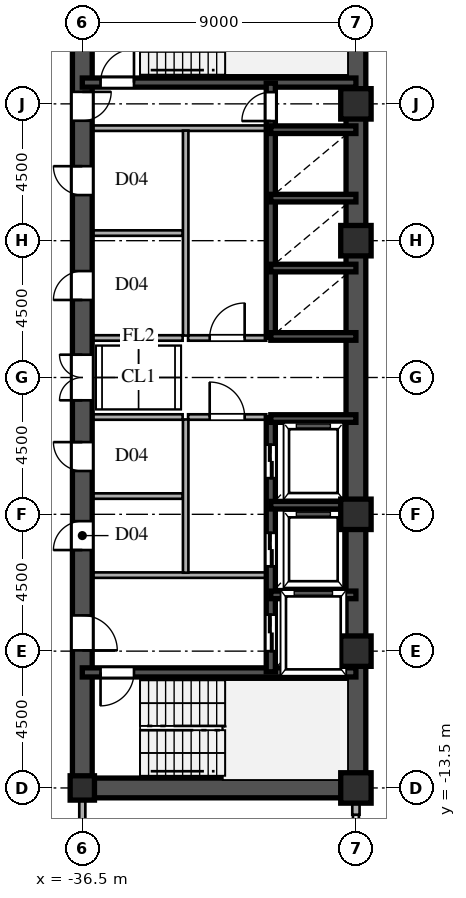
"""IFC4 building model, lengths in metres.
Left out: names, types, materials, properties, quantities, classifications, styles, units other than length and angle.
Written with IfcOpenShell. Run it as: python <this file> out.ifc"""

import sys

from ifc_helpers import new_model, si_unit, direction, frame, frame_2d, origin, origin_2d, place, context, subcontext, project, spatial, rectangle, hollow_rectangle, i_section, extrude, source, transform, mapped, element, fill, save


model = new_model("IFC4")
c1 = context("Model", 3, precision=1e-05, world=origin(), true_north=direction((0.0, 1.0)))
c2 = subcontext(c1, "Body", "Model", "MODEL_VIEW")
j1 = project(units=[si_unit("LENGTHUNIT", "METRE"), si_unit("PLANEANGLEUNIT", "RADIAN")], contexts=[c1])
p1 = place(None, origin())
s1 = spatial("IfcSite", under=j1, at=p1, CompositionType="ELEMENT")
p2 = place(p1, origin())
s2 = spatial("IfcBuilding", under=s1, at=p2, CompositionType="ELEMENT")
p3 = place(p2, frame((0.0, 0.0, 96.0)))
s3 = spatial("IfcBuildingStorey", under=s2, at=p3, CompositionType="ELEMENT", Elevation=96.0)
m1 = source(origin(), c2, "Body", "SweptSolid", [
    extrude(hollow_rectangle(XDim=1.0, YDim=1.0, WallThickness=0.042, at=origin_2d()), origin(), (0.0, 0.0, 1.0), 3.6),
])
for number, where, z_axis, x_axis in (
    (1, (-27.5, -13.5, 0.0), (0.0, 0.0, 1.0), (1.0, 0.0, 0.0)),
    (2, (-27.5, -9.0, 0.0), (0.0, 0.0, 1.0), (1.0, 0.0, 0.0)),
    (3, (-27.5, -4.5, 0.0), (0.0, 0.0, 1.0), (1.0, 0.0, 0.0)),
    (4, (-27.5, 4.5, 0.0), (0.0, 0.0, 1.0), (1.0, 0.0, 0.0)),
    (5, (-27.5, 9.0, 0.0), (0.0, 0.0, 1.0), (1.0, 0.0, 0.0)),
):
    element("IfcColumn", number, at=place(p3, frame(where, z_axis=z_axis, x_axis=x_axis)), inside=s3, PredefinedType="COLUMN", context=c2, shape_type="MappedRepresentation", body=[
        mapped(m1, transform((0.0, 0.0, 0.0), scale=1.0)),
    ])
m2 = source(origin(), c2, "Body", "SweptSolid", [
    extrude(i_section(OverallWidth=0.8, OverallDepth=0.8, WebThickness=0.032, FlangeThickness=0.05, at=origin_2d()), origin(), (0.0, 0.0, 1.0), 3.6),
])
p4 = place(p3, frame((-36.5, -13.5, 0.0), z_axis=(0.0, 0.0, 1.0), x_axis=(1.0, 0.0, 0.0)))
e6 = element("IfcColumn", 6, at=p4, inside=s3, PredefinedType="COLUMN", context=c2, shape_type="MappedRepresentation", body=[
    mapped(m2, transform((0.0, 0.0, 0.0), scale=1.0)),
])
p5 = place(p3, frame((-27.5, -14.38, 0.0), z_axis=(0.0, 0.0, 1.0), x_axis=(0.0, 1.0, 0.0)))
e7 = element("IfcWall", 7, at=p5, inside=s3, PredefinedType="SOLIDWALL", context=c2, shape_type="SweptSolid", body=[
    extrude(rectangle(XDim=0.55, YDim=0.24, at=frame_2d((0.275, 0.0))), origin(), (0.0, 0.0, 1.0), 2.88),
])
for number, where, z_axis, x_axis in (
    (8, (-27.5, -13.5, 0.0), (0.0, 0.0, 1.0), (0.0, 1.0, 0.0)),
    (9, (-27.5, 1.3, 0.0), (0.0, 0.0, 1.0), (0.0, 1.0, 0.0)),
):
    element("IfcWall", number, at=place(p3, frame(where, z_axis=z_axis, x_axis=x_axis)), inside=s3, PredefinedType="SHEAR", context=c2, shape_type="SweptSolid", body=[
        extrude(rectangle(XDim=12.2, YDim=0.65, at=frame_2d((6.1, 0.0))), origin(), (0.0, 0.0, 1.0), 3.38),
    ])
p6 = place(p3, frame((-27.5, -1.3, 0.0), z_axis=(0.0, 0.0, 1.0), x_axis=(0.0, 1.0, 0.0)))
e10 = element("IfcWall", 10, at=p6, inside=s3, PredefinedType="SHEAR", context=c2, shape_type="SweptSolid", body=[
    extrude(rectangle(XDim=2.6, YDim=0.65, at=frame_2d((1.3, 0.0))), origin(), (0.0, 0.0, 1.0), 3.38),
])
p7 = place(p3, frame((-36.5, -13.5, 0.0), z_axis=(0.0, 0.0, 1.0), x_axis=(1.0, 0.0, 0.0)))
e11 = element("IfcWall", 11, at=p7, inside=s3, PredefinedType="SHEAR", context=c2, shape_type="SweptSolid", body=[
    extrude(rectangle(XDim=9.0, YDim=0.65, at=frame_2d((4.5, 0.0))), origin(), (0.0, 0.0, 1.0), 3.38),
])
p8 = place(p3, frame((-36.5, -13.65, 0.0), z_axis=(0.0, 0.0, 1.0), x_axis=(0.0, 1.0, 0.0)))
e12 = element("IfcWall", 12, at=p8, inside=s3, PredefinedType="SHEAR", context=c2, shape_type="SweptSolid", body=[
    extrude(rectangle(XDim=7.15, YDim=0.65, at=frame_2d((3.575, 0.0))), origin(), (0.0, 0.0, 1.0), 3.38),
])
p9 = place(p8, frame((4.675, 0.0, 0.0)))
e13 = element("IfcOpeningElement", 13, at=p9, cuts=e12, PredefinedType="OPENING", context=c2, shape_type="SweptSolid", body=[
    extrude(rectangle(XDim=1.15, YDim=2.2, at=frame_2d((0.575, 1.1))), frame((0.0, 0.335, 0.0), z_axis=(0.0, -1.0, 0.0), x_axis=(1.0, 0.0, 0.0)), (0.0, 0.0, 1.0), 0.67),
])
p10 = place(p3, frame((-36.5, -1.3, 0.0), z_axis=(0.0, 0.0, 1.0), x_axis=(0.0, 1.0, 0.0)))
e14 = element("IfcWall", 14, at=p10, inside=s3, PredefinedType="SHEAR", context=c2, shape_type="SweptSolid", body=[
    extrude(rectangle(XDim=2.6, YDim=0.65, at=frame_2d((1.3, 0.0))), origin(), (0.0, 0.0, 1.0), 3.38),
])
p11 = place(p10, frame((0.55, 0.0, 0.0)))
e15 = element("IfcOpeningElement", 15, at=p11, cuts=e14, PredefinedType="OPENING", context=c2, shape_type="SweptSolid", body=[
    extrude(rectangle(XDim=1.5, YDim=2.3, at=frame_2d((0.75, 1.15))), frame((0.0, 0.335, 0.0), z_axis=(0.0, -1.0, 0.0), x_axis=(1.0, 0.0, 0.0)), (0.0, 0.0, 1.0), 0.67),
])
p12 = place(p3, frame((-36.5, 8.2, 0.0), z_axis=(0.0, 0.0, 1.0), x_axis=(0.0, 1.0, 0.0)))
e16 = element("IfcWall", 16, at=p12, inside=s3, PredefinedType="SHEAR", context=c2, shape_type="SweptSolid", body=[
    extrude(rectangle(XDim=5.45, YDim=0.65, at=frame_2d((2.725, 0.0))), origin(), (0.0, 0.0, 1.0), 3.38),
])
p13 = place(p12, frame((0.245, 0.0, 0.0)))
e17 = element("IfcOpeningElement", 17, at=p13, cuts=e16, PredefinedType="OPENING", context=c2, shape_type="SweptSolid", body=[
    extrude(rectangle(XDim=0.95, YDim=2.15, at=frame_2d((0.475, 1.075))), frame((0.0, 0.335, 0.0), z_axis=(0.0, -1.0, 0.0), x_axis=(1.0, 0.0, 0.0)), (0.0, 0.0, 1.0), 0.67),
])
p14 = place(p3, frame((-36.5, -6.5, 0.0), z_axis=(0.0, 0.0, 1.0), x_axis=(0.0, 1.0, 0.0)))
e18 = element("IfcWall", 18, at=p14, inside=s3, PredefinedType="SHEAR", context=c2, shape_type="SweptSolid", body=[
    extrude(rectangle(XDim=2.6, YDim=0.65, at=frame_2d((1.3, 0.0))), origin(), (0.0, 0.0, 1.0), 3.38),
])
p15 = place(p14, frame((0.825, 0.0, 0.0)))
e19 = element("IfcOpeningElement", 19, at=p15, cuts=e18, PredefinedType="OPENING", context=c2, shape_type="SweptSolid", body=[
    extrude(rectangle(XDim=0.95, YDim=2.15, at=frame_2d((0.475, 1.075))), frame((0.0, 0.335, 0.0), z_axis=(0.0, -1.0, 0.0), x_axis=(1.0, 0.0, 0.0)), (0.0, 0.0, 1.0), 0.67),
])
p16 = place(p3, frame((-36.5, -3.9, 0.0), z_axis=(0.0, 0.0, 1.0), x_axis=(0.0, 1.0, 0.0)))
e20 = element("IfcWall", 20, at=p16, inside=s3, PredefinedType="SHEAR", context=c2, shape_type="SweptSolid", body=[
    extrude(rectangle(XDim=2.6, YDim=0.65, at=frame_2d((1.3, 0.0))), origin(), (0.0, 0.0, 1.0), 3.38),
])
p17 = place(p16, frame((0.825, 0.0, 0.0)))
e21 = element("IfcOpeningElement", 21, at=p17, cuts=e20, PredefinedType="OPENING", context=c2, shape_type="SweptSolid", body=[
    extrude(rectangle(XDim=0.95, YDim=2.15, at=frame_2d((0.475, 1.075))), frame((0.0, 0.335, 0.0), z_axis=(0.0, -1.0, 0.0), x_axis=(1.0, 0.0, 0.0)), (0.0, 0.0, 1.0), 0.67),
])
p18 = place(p3, frame((-36.5, 1.3, 0.0), z_axis=(0.0, 0.0, 1.0), x_axis=(0.0, 1.0, 0.0)))
e22 = element("IfcWall", 22, at=p18, inside=s3, PredefinedType="SHEAR", context=c2, shape_type="SweptSolid", body=[
    extrude(rectangle(XDim=3.45, YDim=0.65, at=frame_2d((1.725, 0.0))), origin(), (0.0, 0.0, 1.0), 3.38),
])
p19 = place(p18, frame((1.25, 0.0, 0.0)))
e23 = element("IfcOpeningElement", 23, at=p19, cuts=e22, PredefinedType="OPENING", context=c2, shape_type="SweptSolid", body=[
    extrude(rectangle(XDim=0.95, YDim=2.15, at=frame_2d((0.475, 1.075))), frame((0.0, 0.335, 0.0), z_axis=(0.0, -1.0, 0.0), x_axis=(1.0, 0.0, 0.0)), (0.0, 0.0, 1.0), 0.67),
])
p20 = place(p3, frame((-36.5, 4.75, 0.0), z_axis=(0.0, 0.0, 1.0), x_axis=(0.0, 1.0, 0.0)))
e24 = element("IfcWall", 24, at=p20, inside=s3, PredefinedType="SHEAR", context=c2, shape_type="SweptSolid", body=[
    extrude(rectangle(XDim=3.45, YDim=0.65, at=frame_2d((1.725, 0.0))), origin(), (0.0, 0.0, 1.0), 3.38),
])
p21 = place(p20, frame((1.25, 0.0, 0.0)))
e25 = element("IfcOpeningElement", 25, at=p21, cuts=e24, PredefinedType="OPENING", context=c2, shape_type="SweptSolid", body=[
    extrude(rectangle(XDim=0.95, YDim=2.15, at=frame_2d((0.475, 1.075))), frame((0.0, 0.335, 0.0), z_axis=(0.0, -1.0, 0.0), x_axis=(1.0, 0.0, 0.0)), (0.0, 0.0, 1.0), 0.67),
])
p22 = place(p3, frame((-36.5, -9.7, 0.0), z_axis=(0.0, 0.0, 1.0), x_axis=(1.0, 0.0, 0.0)))
e26 = element("IfcWall", 26, at=p22, inside=s3, PredefinedType="SHEAR", context=c2, shape_type="SweptSolid", body=[
    extrude(rectangle(XDim=9.0, YDim=0.3, at=frame_2d((4.5, 0.0))), origin(), (0.0, 0.0, 1.0), 3.38),
])
p23 = place(p22, frame((0.6, 0.0, 0.0)))
e27 = element("IfcOpeningElement", 27, at=p23, cuts=e26, PredefinedType="OPENING", context=c2, shape_type="SweptSolid", body=[
    extrude(rectangle(XDim=1.1, YDim=2.2, at=frame_2d((0.55, 1.1))), frame((0.0, 0.16, 0.0), z_axis=(0.0, -1.0, 0.0), x_axis=(1.0, 0.0, 0.0)), (0.0, 0.0, 1.0), 0.32),
])
p24 = place(p3, frame((-36.5, 9.7, 0.0), z_axis=(0.0, 0.0, 1.0), x_axis=(1.0, 0.0, 0.0)))
e28 = element("IfcWall", 28, at=p24, inside=s3, PredefinedType="SHEAR", context=c2, shape_type="SweptSolid", body=[
    extrude(rectangle(XDim=9.0, YDim=0.3, at=frame_2d((4.5, 0.0))), origin(), (0.0, 0.0, 1.0), 3.38),
])
p25 = place(p24, frame((0.6, 0.0, 0.0)))
e29 = element("IfcOpeningElement", 29, at=p25, cuts=e28, PredefinedType="OPENING", context=c2, shape_type="SweptSolid", body=[
    extrude(rectangle(XDim=1.1, YDim=2.2, at=frame_2d((0.55, 1.1))), frame((0.0, 0.16, 0.0), z_axis=(0.0, -1.0, 0.0), x_axis=(1.0, 0.0, 0.0)), (0.0, 0.0, 1.0), 0.32),
])
for number, where, z_axis, x_axis in (
    (30, (-30.3, -7.15, 0.0), (0.0, 0.0, 1.0), (1.0, 0.0, 0.0)),
    (31, (-30.3, -4.2, 0.0), (0.0, 0.0, 1.0), (1.0, 0.0, 0.0)),
    (32, (-30.3, -1.35, 0.0), (0.0, 0.0, 1.0), (1.0, 0.0, 0.0)),
    (33, (-30.3, 1.35, 0.0), (0.0, 0.0, 1.0), (1.0, 0.0, 0.0)),
    (34, (-30.3, 3.6, 0.0), (0.0, 0.0, 1.0), (1.0, 0.0, 0.0)),
    (35, (-30.3, 5.9, 0.0), (0.0, 0.0, 1.0), (1.0, 0.0, 0.0)),
    (36, (-30.3, 8.15, 0.0), (0.0, 0.0, 1.0), (1.0, 0.0, 0.0)),
):
    element("IfcWall", number, at=place(p3, frame(where, z_axis=z_axis, x_axis=x_axis)), inside=s3, PredefinedType="SHEAR", context=c2, shape_type="SweptSolid", body=[
        extrude(rectangle(XDim=2.8, YDim=0.25, at=frame_2d((1.4, 0.0))), origin(), (0.0, 0.0, 1.0), 3.38),
    ])
p26 = place(p3, frame((-30.3, -9.68, 0.0), z_axis=(0.0, 0.0, 1.0), x_axis=(0.0, 1.0, 0.0)))
e37 = element("IfcWall", 37, at=p26, inside=s3, PredefinedType="SHEAR", context=c2, shape_type="SweptSolid", body=[
    extrude(rectangle(XDim=2.56, YDim=0.3, at=frame_2d((1.28, 0.0))), origin(), (0.0, 0.0, 1.0), 3.38),
])
p27 = place(p26, frame((0.68, 0.0, 0.0)))
e38 = element("IfcOpeningElement", 38, at=p27, cuts=e37, PredefinedType="OPENING", context=c2, shape_type="SweptSolid", body=[
    extrude(rectangle(XDim=1.2, YDim=2.25, at=frame_2d((0.6, 1.125))), frame((0.0, 0.16, 0.0), z_axis=(0.0, -1.0, 0.0), x_axis=(1.0, 0.0, 0.0)), (0.0, 0.0, 1.0), 0.32),
])
p28 = place(p3, frame((-30.3, -7.12, 0.0), z_axis=(0.0, 0.0, 1.0), x_axis=(0.0, 1.0, 0.0)))
e39 = element("IfcWall", 39, at=p28, inside=s3, PredefinedType="SHEAR", context=c2, shape_type="SweptSolid", body=[
    extrude(rectangle(XDim=2.92, YDim=0.3, at=frame_2d((1.46, 0.0))), origin(), (0.0, 0.0, 1.0), 3.38),
])
p29 = place(p28, frame((0.91, 0.0, 0.0)))
e40 = element("IfcOpeningElement", 40, at=p29, cuts=e39, PredefinedType="OPENING", context=c2, shape_type="SweptSolid", body=[
    extrude(rectangle(XDim=1.1, YDim=2.2, at=frame_2d((0.55, 1.1))), frame((0.0, 0.16, 0.0), z_axis=(0.0, -1.0, 0.0), x_axis=(1.0, 0.0, 0.0)), (0.0, 0.0, 1.0), 0.32),
])
p30 = place(p3, frame((-30.3, -4.2, 0.0), z_axis=(0.0, 0.0, 1.0), x_axis=(0.0, 1.0, 0.0)))
e41 = element("IfcWall", 41, at=p30, inside=s3, PredefinedType="SHEAR", context=c2, shape_type="SweptSolid", body=[
    extrude(rectangle(XDim=2.88, YDim=0.3, at=frame_2d((1.44, 0.0))), origin(), (0.0, 0.0, 1.0), 3.38),
])
p31 = place(p30, frame((0.89, 0.0, 0.0)))
e42 = element("IfcOpeningElement", 42, at=p31, cuts=e41, PredefinedType="OPENING", context=c2, shape_type="SweptSolid", body=[
    extrude(rectangle(XDim=1.1, YDim=2.2, at=frame_2d((0.55, 1.1))), frame((0.0, 0.16, 0.0), z_axis=(0.0, -1.0, 0.0), x_axis=(1.0, 0.0, 0.0)), (0.0, 0.0, 1.0), 0.32),
])
p32 = place(p3, frame((-30.3, 1.32, 0.0), z_axis=(0.0, 0.0, 1.0), x_axis=(0.0, 1.0, 0.0)))
e43 = element("IfcWall", 43, at=p32, inside=s3, PredefinedType="SHEAR", context=c2, shape_type="SweptSolid", body=[
    extrude(rectangle(XDim=2.28, YDim=0.3, at=frame_2d((1.14, 0.0))), origin(), (0.0, 0.0, 1.0), 3.38),
])
p33 = place(p3, frame((-30.3, 3.6, 0.0), z_axis=(0.0, 0.0, 1.0), x_axis=(0.0, 1.0, 0.0)))
e44 = element("IfcWall", 44, at=p33, inside=s3, PredefinedType="SHEAR", context=c2, shape_type="SweptSolid", body=[
    extrude(rectangle(XDim=2.3, YDim=0.3, at=frame_2d((1.15, 0.0))), origin(), (0.0, 0.0, 1.0), 3.38),
])
p34 = place(p3, frame((-30.3, 5.9, 0.0), z_axis=(0.0, 0.0, 1.0), x_axis=(0.0, 1.0, 0.0)))
e45 = element("IfcWall", 45, at=p34, inside=s3, PredefinedType="SHEAR", context=c2, shape_type="SweptSolid", body=[
    extrude(rectangle(XDim=2.25, YDim=0.3, at=frame_2d((1.125, 0.0))), origin(), (0.0, 0.0, 1.0), 3.38),
])
p35 = place(p3, frame((-30.3, 8.15, 0.0), z_axis=(0.0, 0.0, 1.0), x_axis=(0.0, 1.0, 0.0)))
e46 = element("IfcWall", 46, at=p35, inside=s3, PredefinedType="SHEAR", context=c2, shape_type="SweptSolid", body=[
    extrude(rectangle(XDim=1.53, YDim=0.3, at=frame_2d((0.765, 0.0))), origin(), (0.0, 0.0, 1.0), 3.38),
])
p36 = place(p35, frame((0.285, 0.0, 0.0)))
e47 = element("IfcOpeningElement", 47, at=p36, cuts=e46, PredefinedType="OPENING", context=c2, shape_type="SweptSolid", body=[
    extrude(rectangle(XDim=0.95, YDim=2.15, at=frame_2d((0.475, 1.075))), frame((0.0, 0.16, 0.0), z_axis=(0.0, -1.0, 0.0), x_axis=(1.0, 0.0, 0.0)), (0.0, 0.0, 1.0), 0.32),
])
for number, where, z_axis, x_axis in (
    (48, (-36.15, -6.5, 0.0), (0.0, 0.0, 1.0), (1.0, 0.0, 0.0)),
    (49, (-36.15, 8.2, 0.0), (0.0, 0.0, 1.0), (1.0, 0.0, 0.0)),
):
    element("IfcWall", number, at=place(p3, frame(where, z_axis=z_axis, x_axis=x_axis)), inside=s3, PredefinedType="PARTITIONING", context=c2, shape_type="SweptSolid", body=[
        extrude(rectangle(XDim=5.7, YDim=0.18, at=frame_2d((2.85, 0.0))), origin(), (0.0, 0.0, 1.0), 3.38),
    ])
p37 = place(p3, frame((-33.1, -6.42, 0.0), z_axis=(0.0, 0.0, 1.0), x_axis=(0.0, 1.0, 0.0)))
e50 = element("IfcWall", 50, at=p37, inside=s3, PredefinedType="PARTITIONING", context=c2, shape_type="SweptSolid", body=[
    extrude(rectangle(XDim=5.04, YDim=0.18, at=frame_2d((2.52, 0.0))), origin(), (0.0, 0.0, 1.0), 3.38),
])
p38 = place(p3, frame((-33.1, 1.38, 0.0), z_axis=(0.0, 0.0, 1.0), x_axis=(0.0, 1.0, 0.0)))
e51 = element("IfcWall", 51, at=p38, inside=s3, PredefinedType="PARTITIONING", context=c2, shape_type="SweptSolid", body=[
    extrude(rectangle(XDim=6.74, YDim=0.18, at=frame_2d((3.37, 0.0))), origin(), (0.0, 0.0, 1.0), 3.38),
])
p39 = place(p3, frame((-33.02, -1.3, 0.0), z_axis=(0.0, 0.0, 1.0), x_axis=(1.0, 0.0, 0.0)))
e52 = element("IfcWall", 52, at=p39, inside=s3, PredefinedType="PARTITIONING", context=c2, shape_type="SweptSolid", body=[
    extrude(rectangle(XDim=2.57, YDim=0.18, at=frame_2d((1.285, 0.0))), origin(), (0.0, 0.0, 1.0), 3.38),
])
p40 = place(p39, frame((0.71, 0.0, 0.0)))
e53 = element("IfcOpeningElement", 53, at=p40, cuts=e52, PredefinedType="OPENING", context=c2, shape_type="SweptSolid", body=[
    extrude(rectangle(XDim=1.15, YDim=2.2, at=frame_2d((0.575, 1.1))), frame((0.0, 0.1, 0.0), z_axis=(0.0, -1.0, 0.0), x_axis=(1.0, 0.0, 0.0)), (0.0, 0.0, 1.0), 0.2),
])
p41 = place(p3, frame((-33.02, 1.3, 0.0), z_axis=(0.0, 0.0, 1.0), x_axis=(1.0, 0.0, 0.0)))
e54 = element("IfcWall", 54, at=p41, inside=s3, PredefinedType="PARTITIONING", context=c2, shape_type="SweptSolid", body=[
    extrude(rectangle(XDim=2.57, YDim=0.18, at=frame_2d((1.285, 0.0))), origin(), (0.0, 0.0, 1.0), 3.38),
])
p42 = place(p41, frame((0.71, 0.0, 0.0)))
e55 = element("IfcOpeningElement", 55, at=p42, cuts=e54, PredefinedType="OPENING", context=c2, shape_type="SweptSolid", body=[
    extrude(rectangle(XDim=1.15, YDim=2.2, at=frame_2d((0.575, 1.1))), frame((0.0, 0.1, 0.0), z_axis=(0.0, -1.0, 0.0), x_axis=(1.0, 0.0, 0.0)), (0.0, 0.0, 1.0), 0.2),
])
for number, where, z_axis, x_axis in (
    (56, (-36.15, -1.3, 0.0), (0.0, 0.0, 1.0), (1.0, 0.0, 0.0)),
    (57, (-36.15, 1.3, 0.0), (0.0, 0.0, 1.0), (1.0, 0.0, 0.0)),
    (58, (-36.15, -3.9, 0.0), (0.0, 0.0, 1.0), (1.0, 0.0, 0.0)),
    (59, (-36.15, 4.75, 0.0), (0.0, 0.0, 1.0), (1.0, 0.0, 0.0)),
):
    element("IfcWall", number, at=place(p3, frame(where, z_axis=z_axis, x_axis=x_axis)), inside=s3, PredefinedType="PARTITIONING", context=c2, shape_type="SweptSolid", body=[
        extrude(rectangle(XDim=2.95, YDim=0.18, at=frame_2d((1.475, 0.0))), origin(), (0.0, 0.0, 1.0), 3.38),
    ])
p43 = place(p3, frame((-36.5, -15.515, 0.0), z_axis=(0.0, 0.0, 1.0), x_axis=(0.0, 1.0, 0.0)))
e60 = element("IfcWall", 60, at=p43, inside=s3, PredefinedType="PARTITIONING", context=c2, shape_type="SweptSolid", body=[
    extrude(rectangle(XDim=1.685, YDim=0.2, at=frame_2d((0.842, 0.0))), origin(), (0.0, 0.0, 1.0), 2.68),
])
m3 = source(origin(), c2, "Body", "SweptSolid", [
    extrude(rectangle(XDim=1.15, YDim=2.2, at=frame_2d((0.575, 1.1))), frame((0.0, 0.025, 0.0), z_axis=(0.0, -1.0, 0.0), x_axis=(1.0, 0.0, 0.0)), (0.0, 0.0, 1.0), 0.05),
])
p44 = place(p9, frame((1.15, 0.0, 0.0), z_axis=(0.0, 0.0, 1.0), x_axis=(-1.0, 0.0, 0.0)))
e61 = element("IfcDoor", 61, at=p44, inside=s3, OperationType="SINGLE_SWING_LEFT", PredefinedType="DOOR", context=c2, shape_type="MappedRepresentation", body=[
    mapped(m3, transform((0.0, 0.0, 0.0), scale=1.0)),
])
fill(e13, e61)
m4 = source(origin(), c2, "Body", "SweptSolid", [
    extrude(rectangle(XDim=1.5, YDim=2.3, at=frame_2d((0.75, 1.15))), frame((0.0, 0.025, 0.0), z_axis=(0.0, -1.0, 0.0), x_axis=(1.0, 0.0, 0.0)), (0.0, 0.0, 1.0), 0.05),
])
p45 = place(p11, origin())
e62 = element("IfcDoor", 62, at=p45, inside=s3, OperationType="DOUBLE_SWING_LEFT", PredefinedType="DOOR", context=c2, shape_type="MappedRepresentation", body=[
    mapped(m4, transform((0.0, 0.0, 0.0), scale=1.0)),
])
fill(e15, e62)
m5 = source(origin(), c2, "Body", "SweptSolid", [
    extrude(rectangle(XDim=0.95, YDim=2.15, at=frame_2d((0.475, 1.075))), frame((0.0, 0.025, 0.0), z_axis=(0.0, -1.0, 0.0), x_axis=(1.0, 0.0, 0.0)), (0.0, 0.0, 1.0), 0.05),
])
p46 = place(p13, frame((0.95, 0.0, 0.0), z_axis=(0.0, 0.0, 1.0), x_axis=(-1.0, 0.0, 0.0)))
e63 = element("IfcDoor", 63, at=p46, inside=s3, OperationType="SINGLE_SWING_RIGHT", PredefinedType="DOOR", context=c2, shape_type="MappedRepresentation", body=[
    mapped(m5, transform((0.0, 0.0, 0.0), scale=1.0)),
])
fill(e17, e63)
p47 = place(p15, origin())
e64 = element("IfcDoor", 64, at=p47, inside=s3, OperationType="SINGLE_SWING_LEFT", PredefinedType="DOOR", context=c2, shape_type="MappedRepresentation", body=[
    mapped(m5, transform((0.0, 0.0, 0.0), scale=1.0)),
])
fill(e19, e64)
p48 = place(p17, origin())
e65 = element("IfcDoor", 65, at=p48, inside=s3, OperationType="SINGLE_SWING_RIGHT", PredefinedType="DOOR", context=c2, shape_type="MappedRepresentation", body=[
    mapped(m5, transform((0.0, 0.0, 0.0), scale=1.0)),
])
fill(e21, e65)
p49 = place(p19, origin())
e66 = element("IfcDoor", 66, at=p49, inside=s3, OperationType="SINGLE_SWING_LEFT", PredefinedType="DOOR", context=c2, shape_type="MappedRepresentation", body=[
    mapped(m5, transform((0.0, 0.0, 0.0), scale=1.0)),
])
fill(e23, e66)
p50 = place(p21, origin())
e67 = element("IfcDoor", 67, at=p50, inside=s3, OperationType="SINGLE_SWING_RIGHT", PredefinedType="DOOR", context=c2, shape_type="MappedRepresentation", body=[
    mapped(m5, transform((0.0, 0.0, 0.0), scale=1.0)),
])
fill(e25, e67)
m6 = source(origin(), c2, "Body", "SweptSolid", [
    extrude(rectangle(XDim=1.1, YDim=2.2, at=frame_2d((0.55, 1.1))), frame((0.0, 0.025, 0.0), z_axis=(0.0, -1.0, 0.0), x_axis=(1.0, 0.0, 0.0)), (0.0, 0.0, 1.0), 0.05),
])
p51 = place(p23, frame((1.1, 0.0, 0.0), z_axis=(0.0, 0.0, 1.0), x_axis=(-1.0, 0.0, 0.0)))
e68 = element("IfcDoor", 68, at=p51, inside=s3, OperationType="SINGLE_SWING_LEFT", PredefinedType="DOOR", context=c2, shape_type="MappedRepresentation", body=[
    mapped(m6, transform((0.0, 0.0, 0.0), scale=1.0)),
])
fill(e27, e68)
p52 = place(p25, origin())
e69 = element("IfcDoor", 69, at=p52, inside=s3, OperationType="SINGLE_SWING_RIGHT", PredefinedType="DOOR", context=c2, shape_type="MappedRepresentation", body=[
    mapped(m6, transform((0.0, 0.0, 0.0), scale=1.0)),
])
fill(e29, e69)
m7 = source(origin(), c2, "Body", "SweptSolid", [
    extrude(rectangle(XDim=1.2, YDim=2.25, at=frame_2d((0.6, 1.125))), frame((0.0, 0.025, 0.0), z_axis=(0.0, -1.0, 0.0), x_axis=(1.0, 0.0, 0.0)), (0.0, 0.0, 1.0), 0.05),
])
p53 = place(p27, origin())
e70 = element("IfcDoor", 70, at=p53, inside=s3, OperationType="DOUBLE_DOOR_SLIDING", PredefinedType="DOOR", context=c2, shape_type="MappedRepresentation", body=[
    mapped(m7, transform((0.0, 0.0, 0.0), scale=1.0)),
])
fill(e38, e70)
m8 = source(origin(), c2, "Body", "SweptSolid", [
    extrude(rectangle(XDim=1.1, YDim=2.2, at=frame_2d((0.55, 1.1))), frame((0.0, 0.025, 0.0), z_axis=(0.0, -1.0, 0.0), x_axis=(1.0, 0.0, 0.0)), (0.0, 0.0, 1.0), 0.05),
])
p54 = place(p29, origin())
e71 = element("IfcDoor", 71, at=p54, inside=s3, OperationType="DOUBLE_DOOR_SLIDING", PredefinedType="DOOR", context=c2, shape_type="MappedRepresentation", body=[
    mapped(m8, transform((0.0, 0.0, 0.0), scale=1.0)),
])
fill(e40, e71)
p55 = place(p31, origin())
e72 = element("IfcDoor", 72, at=p55, inside=s3, OperationType="DOUBLE_DOOR_SLIDING", PredefinedType="DOOR", context=c2, shape_type="MappedRepresentation", body=[
    mapped(m8, transform((0.0, 0.0, 0.0), scale=1.0)),
])
fill(e42, e72)
p56 = place(p36, origin())
e73 = element("IfcDoor", 73, at=p56, inside=s3, OperationType="SINGLE_SWING_LEFT", PredefinedType="DOOR", context=c2, shape_type="MappedRepresentation", body=[
    mapped(m5, transform((0.0, 0.0, 0.0), scale=1.0)),
])
fill(e47, e73)
p57 = place(p40, origin())
e74 = element("IfcDoor", 74, at=p57, inside=s3, OperationType="SINGLE_SWING_LEFT", PredefinedType="DOOR", context=c2, shape_type="MappedRepresentation", body=[
    mapped(m3, transform((0.0, 0.0, 0.0), scale=1.0)),
])
fill(e53, e74)
p58 = place(p42, origin())
e75 = element("IfcDoor", 75, at=p58, inside=s3, OperationType="SINGLE_SWING_RIGHT", PredefinedType="DOOR", context=c2, shape_type="MappedRepresentation", body=[
    mapped(m3, transform((0.0, 0.0, 0.0), scale=1.0)),
])
fill(e55, e75)
save(model, sys.argv[1])
